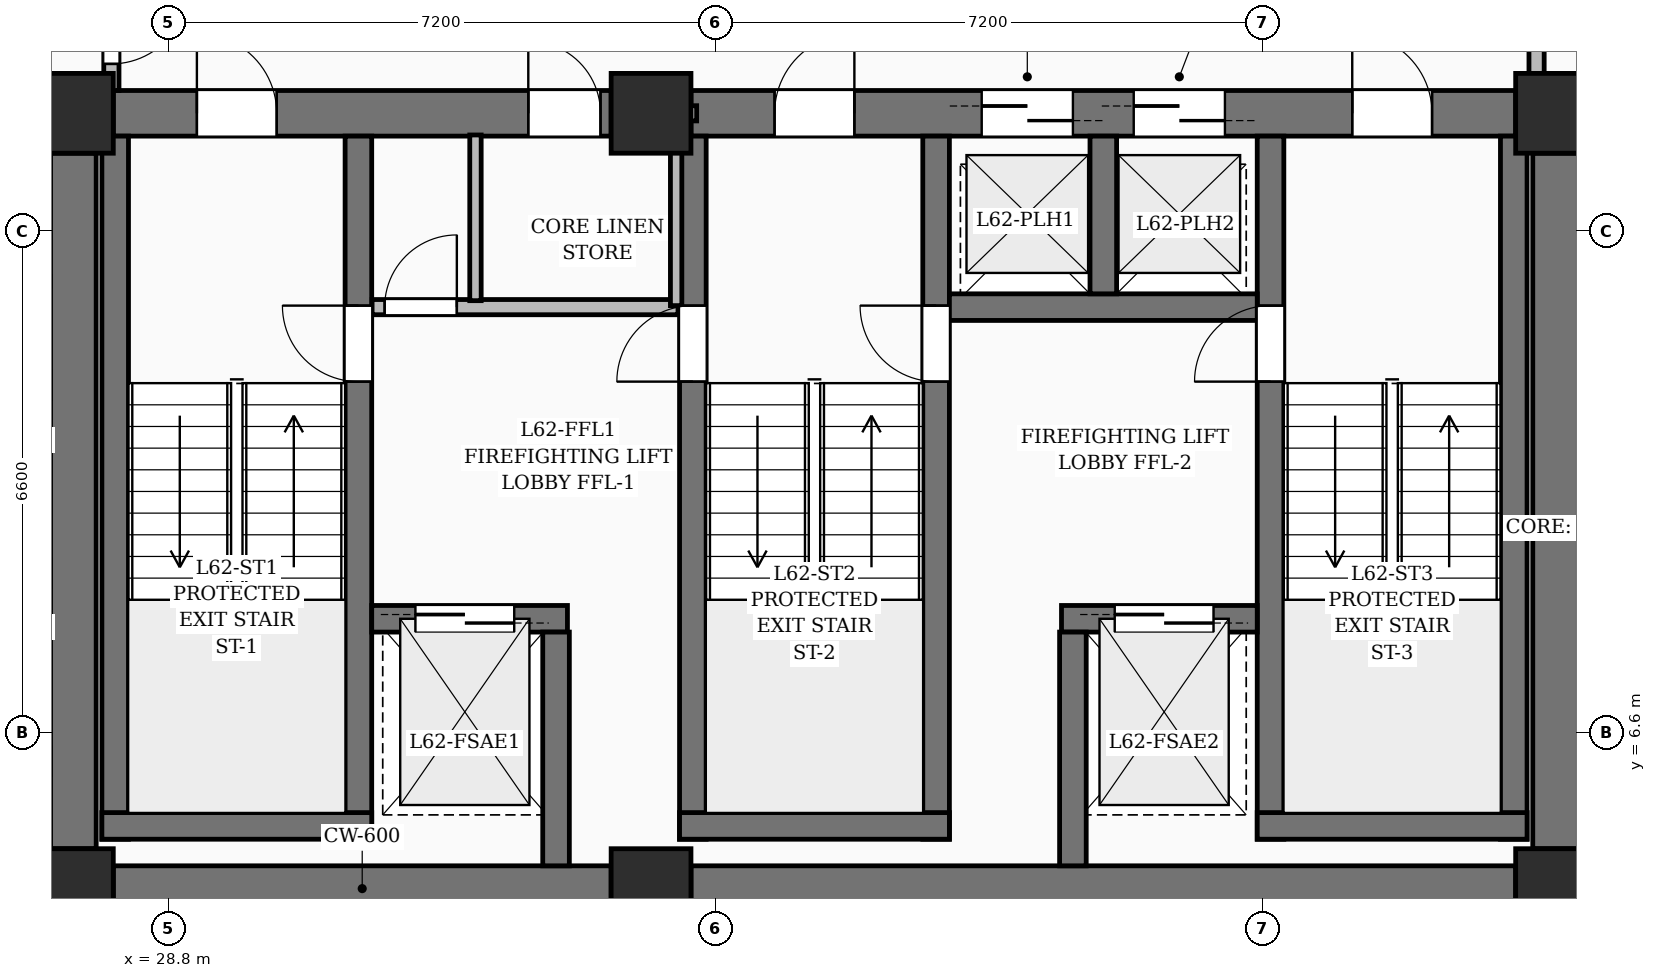
"""IFC4 building model, lengths in metres.
Left out: names, types, materials, properties, quantities, classifications, styles, units other than length and angle.
Written with IfcOpenShell. Run it as: python <this file> out.ifc"""

import sys

from ifc_helpers import new_model, si_unit, direction, frame, frame_2d, origin, origin_2d, place, context, subcontext, project, spatial, rectangle, extrude, element, fill, save


model = new_model("IFC4")
c1 = context("Model", 3, precision=1e-05, world=origin(), true_north=direction((0.0, 1.0)))
c2 = subcontext(c1, "Body", "Model", "MODEL_VIEW")
j1 = project(units=[si_unit("LENGTHUNIT", "METRE"), si_unit("PLANEANGLEUNIT", "RADIAN")], contexts=[c1])
p1 = place(None, origin())
s1 = spatial("IfcSite", under=j1, at=p1, CompositionType="ELEMENT")
p2 = place(p1, origin())
s2 = spatial("IfcBuilding", under=s1, at=p2, CompositionType="ELEMENT")
p3 = place(p2, frame((0.0, 0.0, 240.75)))
s3 = spatial("IfcBuildingStorey", under=s2, at=p3, CompositionType="ELEMENT", Elevation=240.75)
for number, where, z_axis, x_axis in (
    (1, (27.55, 4.55, 0.0), (0.0, 0.0, 1.0), (1.0, 0.0, 0.0)),
    (2, (35.15, 4.55, 0.0), (0.0, 0.0, 1.0), (1.0, 0.0, 0.0)),
    (3, (47.05, 4.55, 0.0), (0.0, 0.0, 1.0), (1.0, 0.0, 0.0)),
    (4, (27.55, 14.75, 0.0), (0.0, 0.0, 1.0), (1.0, 0.0, 0.0)),
    (5, (35.15, 14.75, 0.0), (0.0, 0.0, 1.0), (1.0, 0.0, 0.0)),
    (6, (47.05, 14.75, 0.0), (0.0, 0.0, 1.0), (1.0, 0.0, 0.0)),
):
    element("IfcColumn", number, at=place(p3, frame(where, z_axis=z_axis, x_axis=x_axis)), inside=s3, PredefinedType="COLUMN", context=c2, shape_type="SweptSolid", body=[
        extrude(rectangle(XDim=1.05, YDim=1.05, at=origin_2d()), origin(), (0.0, 0.0, 1.0), 3.75),
    ])
p4 = place(p3, frame((28.075, 4.55, 0.0), z_axis=(0.0, 0.0, 1.0), x_axis=(1.0, 0.0, 0.0)))
e7 = element("IfcWall", 7, at=p4, inside=s3, PredefinedType="SHEAR", context=c2, shape_type="SweptSolid", body=[
    extrude(rectangle(XDim=6.55, YDim=0.6, at=frame_2d((3.275, 0.0))), origin(), (0.0, 0.0, 1.0), 3.75),
])
p5 = place(p3, frame((35.675, 4.55, 0.0), z_axis=(0.0, 0.0, 1.0), x_axis=(1.0, 0.0, 0.0)))
e8 = element("IfcWall", 8, at=p5, inside=s3, PredefinedType="SHEAR", context=c2, shape_type="SweptSolid", body=[
    extrude(rectangle(XDim=10.85, YDim=0.6, at=frame_2d((5.425, 0.0))), origin(), (0.0, 0.0, 1.0), 3.75),
])
p6 = place(p3, frame((28.075, 14.75, 0.0), z_axis=(0.0, 0.0, 1.0), x_axis=(1.0, 0.0, 0.0)))
e9 = element("IfcWall", 9, at=p6, inside=s3, PredefinedType="SHEAR", context=c2, shape_type="SweptSolid", body=[
    extrude(rectangle(XDim=6.55, YDim=0.6, at=frame_2d((3.275, 0.0))), origin(), (0.0, 0.0, 1.0), 3.75),
])
p7 = place(p6, frame((1.1, 0.0, 0.0)))
e10 = element("IfcOpeningElement", 10, at=p7, cuts=e9, PredefinedType="OPENING", context=c2, shape_type="SweptSolid", body=[
    extrude(rectangle(XDim=1.05, YDim=2.15, at=frame_2d((0.525, 1.075))), frame((0.0, 0.31, 0.0), z_axis=(0.0, -1.0, 0.0), x_axis=(1.0, 0.0, 0.0)), (0.0, 0.0, 1.0), 0.62),
])
p8 = place(p6, frame((5.46, 0.0, 0.0)))
e11 = element("IfcOpeningElement", 11, at=p8, cuts=e9, PredefinedType="OPENING", context=c2, shape_type="SweptSolid", body=[
    extrude(rectangle(XDim=0.95, YDim=2.15, at=frame_2d((0.475, 1.075))), frame((0.0, 0.31, 0.0), z_axis=(0.0, -1.0, 0.0), x_axis=(1.0, 0.0, 0.0)), (0.0, 0.0, 1.0), 0.62),
])
p9 = place(p3, frame((35.675, 14.75, 0.0), z_axis=(0.0, 0.0, 1.0), x_axis=(1.0, 0.0, 0.0)))
e12 = element("IfcWall", 12, at=p9, inside=s3, PredefinedType="SHEAR", context=c2, shape_type="SweptSolid", body=[
    extrude(rectangle(XDim=10.85, YDim=0.6, at=frame_2d((5.425, 0.0))), origin(), (0.0, 0.0, 1.0), 3.75),
])
p10 = place(p9, frame((1.1, 0.0, 0.0)))
e13 = element("IfcOpeningElement", 13, at=p10, cuts=e12, PredefinedType="OPENING", context=c2, shape_type="SweptSolid", body=[
    extrude(rectangle(XDim=1.05, YDim=2.15, at=frame_2d((0.525, 1.075))), frame((0.0, 0.31, 0.0), z_axis=(0.0, -1.0, 0.0), x_axis=(1.0, 0.0, 0.0)), (0.0, 0.0, 1.0), 0.62),
])
p11 = place(p9, frame((8.7, 0.0, 0.0)))
e14 = element("IfcOpeningElement", 14, at=p11, cuts=e12, PredefinedType="OPENING", context=c2, shape_type="SweptSolid", body=[
    extrude(rectangle(XDim=1.05, YDim=2.15, at=frame_2d((0.525, 1.075))), frame((0.0, 0.31, 0.0), z_axis=(0.0, -1.0, 0.0), x_axis=(1.0, 0.0, 0.0)), (0.0, 0.0, 1.0), 0.62),
])
p12 = place(p9, frame((3.825, 0.0, 0.0)))
e15 = element("IfcOpeningElement", 15, at=p12, cuts=e12, PredefinedType="OPENING", context=c2, shape_type="SweptSolid", body=[
    extrude(rectangle(XDim=1.2, YDim=2.2, at=frame_2d((0.6, 1.1))), frame((0.0, 0.31, 0.0), z_axis=(0.0, -1.0, 0.0), x_axis=(1.0, 0.0, 0.0)), (0.0, 0.0, 1.0), 0.62),
])
p13 = place(p9, frame((5.825, 0.0, 0.0)))
e16 = element("IfcOpeningElement", 16, at=p13, cuts=e12, PredefinedType="OPENING", context=c2, shape_type="SweptSolid", body=[
    extrude(rectangle(XDim=1.2, YDim=2.2, at=frame_2d((0.6, 1.1))), frame((0.0, 0.31, 0.0), z_axis=(0.0, -1.0, 0.0), x_axis=(1.0, 0.0, 0.0)), (0.0, 0.0, 1.0), 0.62),
])
for number, where, z_axis, x_axis in (
    (17, (27.55, 5.075, 0.0), (0.0, 0.0, 1.0), (0.0, 1.0, 0.0)),
    (18, (47.05, 5.075, 0.0), (0.0, 0.0, 1.0), (0.0, 1.0, 0.0)),
):
    element("IfcWall", number, at=place(p3, frame(where, z_axis=z_axis, x_axis=x_axis)), inside=s3, PredefinedType="SHEAR", context=c2, shape_type="SweptSolid", body=[
        extrude(rectangle(XDim=9.15, YDim=0.6, at=frame_2d((4.575, 0.0))), origin(), (0.0, 0.0, 1.0), 3.75),
    ])
p14 = place(p3, frame((28.1, 5.2, 0.0), z_axis=(0.0, 0.0, 1.0), x_axis=(0.0, 1.0, 0.0)))
e19 = element("IfcWall", 19, at=p14, inside=s3, PredefinedType="SOLIDWALL", context=c2, shape_type="SweptSolid", body=[
    extrude(rectangle(XDim=9.25, YDim=0.35, at=frame_2d((4.625, 0.0))), origin(), (0.0, 0.0, 1.0), 3.75),
])
p15 = place(p3, frame((31.3, 5.2, 0.0), z_axis=(0.0, 0.0, 1.0), x_axis=(0.0, 1.0, 0.0)))
e20 = element("IfcWall", 20, at=p15, inside=s3, PredefinedType="SOLIDWALL", context=c2, shape_type="SweptSolid", body=[
    extrude(rectangle(XDim=9.25, YDim=0.35, at=frame_2d((4.625, 0.0))), origin(), (0.0, 0.0, 1.0), 3.75),
])
p16 = place(p15, frame((6.02, 0.0, 0.0)))
e21 = element("IfcOpeningElement", 21, at=p16, cuts=e20, PredefinedType="OPENING", context=c2, shape_type="SweptSolid", body=[
    extrude(rectangle(XDim=1.0, YDim=2.15, at=frame_2d((0.5, 1.075))), frame((0.0, 0.185, 0.0), z_axis=(0.0, -1.0, 0.0), x_axis=(1.0, 0.0, 0.0)), (0.0, 0.0, 1.0), 0.37),
])
p17 = place(p3, frame((27.925, 5.375, 0.0), z_axis=(0.0, 0.0, 1.0), x_axis=(1.0, 0.0, 0.0)))
e22 = element("IfcWall", 22, at=p17, inside=s3, PredefinedType="SOLIDWALL", context=c2, shape_type="SweptSolid", body=[
    extrude(rectangle(XDim=3.55, YDim=0.35, at=frame_2d((1.775, 0.0))), origin(), (0.0, 0.0, 1.0), 3.75),
])
p18 = place(p3, frame((35.7, 5.2, 0.0), z_axis=(0.0, 0.0, 1.0), x_axis=(0.0, 1.0, 0.0)))
e23 = element("IfcWall", 23, at=p18, inside=s3, PredefinedType="SOLIDWALL", context=c2, shape_type="SweptSolid", body=[
    extrude(rectangle(XDim=9.25, YDim=0.35, at=frame_2d((4.625, 0.0))), origin(), (0.0, 0.0, 1.0), 3.75),
])
p19 = place(p18, frame((6.02, 0.0, 0.0)))
e24 = element("IfcOpeningElement", 24, at=p19, cuts=e23, PredefinedType="OPENING", context=c2, shape_type="SweptSolid", body=[
    extrude(rectangle(XDim=1.0, YDim=2.15, at=frame_2d((0.5, 1.075))), frame((0.0, 0.185, 0.0), z_axis=(0.0, -1.0, 0.0), x_axis=(1.0, 0.0, 0.0)), (0.0, 0.0, 1.0), 0.37),
])
p20 = place(p3, frame((38.9, 5.2, 0.0), z_axis=(0.0, 0.0, 1.0), x_axis=(0.0, 1.0, 0.0)))
e25 = element("IfcWall", 25, at=p20, inside=s3, PredefinedType="SOLIDWALL", context=c2, shape_type="SweptSolid", body=[
    extrude(rectangle(XDim=9.25, YDim=0.35, at=frame_2d((4.625, 0.0))), origin(), (0.0, 0.0, 1.0), 3.75),
])
p21 = place(p20, frame((6.02, 0.0, 0.0)))
e26 = element("IfcOpeningElement", 26, at=p21, cuts=e25, PredefinedType="OPENING", context=c2, shape_type="SweptSolid", body=[
    extrude(rectangle(XDim=1.0, YDim=2.15, at=frame_2d((0.5, 1.075))), frame((0.0, 0.185, 0.0), z_axis=(0.0, -1.0, 0.0), x_axis=(1.0, 0.0, 0.0)), (0.0, 0.0, 1.0), 0.37),
])
p22 = place(p3, frame((35.525, 5.375, 0.0), z_axis=(0.0, 0.0, 1.0), x_axis=(1.0, 0.0, 0.0)))
e27 = element("IfcWall", 27, at=p22, inside=s3, PredefinedType="SOLIDWALL", context=c2, shape_type="SweptSolid", body=[
    extrude(rectangle(XDim=3.55, YDim=0.35, at=frame_2d((1.775, 0.0))), origin(), (0.0, 0.0, 1.0), 3.75),
])
p23 = place(p3, frame((43.3, 5.2, 0.0), z_axis=(0.0, 0.0, 1.0), x_axis=(0.0, 1.0, 0.0)))
e28 = element("IfcWall", 28, at=p23, inside=s3, PredefinedType="SOLIDWALL", context=c2, shape_type="SweptSolid", body=[
    extrude(rectangle(XDim=9.25, YDim=0.35, at=frame_2d((4.625, 0.0))), origin(), (0.0, 0.0, 1.0), 3.75),
])
p24 = place(p23, frame((6.02, 0.0, 0.0)))
e29 = element("IfcOpeningElement", 29, at=p24, cuts=e28, PredefinedType="OPENING", context=c2, shape_type="SweptSolid", body=[
    extrude(rectangle(XDim=1.0, YDim=2.15, at=frame_2d((0.5, 1.075))), frame((0.0, 0.185, 0.0), z_axis=(0.0, -1.0, 0.0), x_axis=(1.0, 0.0, 0.0)), (0.0, 0.0, 1.0), 0.37),
])
p25 = place(p3, frame((46.5, 5.2, 0.0), z_axis=(0.0, 0.0, 1.0), x_axis=(0.0, 1.0, 0.0)))
e30 = element("IfcWall", 30, at=p25, inside=s3, PredefinedType="SOLIDWALL", context=c2, shape_type="SweptSolid", body=[
    extrude(rectangle(XDim=9.25, YDim=0.35, at=frame_2d((4.625, 0.0))), origin(), (0.0, 0.0, 1.0), 3.75),
])
p26 = place(p3, frame((43.125, 5.375, 0.0), z_axis=(0.0, 0.0, 1.0), x_axis=(1.0, 0.0, 0.0)))
e31 = element("IfcWall", 31, at=p26, inside=s3, PredefinedType="SOLIDWALL", context=c2, shape_type="SweptSolid", body=[
    extrude(rectangle(XDim=3.55, YDim=0.35, at=frame_2d((1.775, 0.0))), origin(), (0.0, 0.0, 1.0), 3.75),
])
p27 = place(p3, frame((31.475, 8.1, 0.0), z_axis=(0.0, 0.0, 1.0), x_axis=(1.0, 0.0, 0.0)))
e32 = element("IfcWall", 32, at=p27, inside=s3, PredefinedType="SOLIDWALL", context=c2, shape_type="SweptSolid", body=[
    extrude(rectangle(XDim=2.575, YDim=0.35, at=frame_2d((1.288, 0.0))), origin(), (0.0, 0.0, 1.0), 3.75),
])
p28 = place(p27, frame((0.575, 0.0, 0.0)))
e33 = element("IfcOpeningElement", 33, at=p28, cuts=e32, PredefinedType="OPENING", context=c2, shape_type="SweptSolid", body=[
    extrude(rectangle(XDim=1.3, YDim=2.25, at=frame_2d((0.65, 1.125))), frame((0.0, 0.185, 0.0), z_axis=(0.0, -1.0, 0.0), x_axis=(1.0, 0.0, 0.0)), (0.0, 0.0, 1.0), 0.37),
])
p29 = place(p3, frame((40.55, 8.1, 0.0), z_axis=(0.0, 0.0, 1.0), x_axis=(1.0, 0.0, 0.0)))
e34 = element("IfcWall", 34, at=p29, inside=s3, PredefinedType="SOLIDWALL", context=c2, shape_type="SweptSolid", body=[
    extrude(rectangle(XDim=2.575, YDim=0.35, at=frame_2d((1.288, 0.0))), origin(), (0.0, 0.0, 1.0), 3.75),
])
p30 = place(p29, frame((0.7, 0.0, 0.0)))
e35 = element("IfcOpeningElement", 35, at=p30, cuts=e34, PredefinedType="OPENING", context=c2, shape_type="SweptSolid", body=[
    extrude(rectangle(XDim=1.3, YDim=2.25, at=frame_2d((0.65, 1.125))), frame((0.0, 0.185, 0.0), z_axis=(0.0, -1.0, 0.0), x_axis=(1.0, 0.0, 0.0)), (0.0, 0.0, 1.0), 0.37),
])
for number, where, z_axis, x_axis in (
    (36, (33.9, 4.85, 0.0), (0.0, 0.0, 1.0), (0.0, 1.0, 0.0)),
    (37, (40.7, 4.85, 0.0), (0.0, 0.0, 1.0), (0.0, 1.0, 0.0)),
):
    element("IfcWall", number, at=place(p3, frame(where, z_axis=z_axis, x_axis=x_axis)), inside=s3, PredefinedType="SOLIDWALL", context=c2, shape_type="SweptSolid", body=[
        extrude(rectangle(XDim=3.075, YDim=0.35, at=frame_2d((1.538, 0.0))), origin(), (0.0, 0.0, 1.0), 3.75),
    ])
p31 = place(p3, frame((39.075, 12.2, 0.0), z_axis=(0.0, 0.0, 1.0), x_axis=(1.0, 0.0, 0.0)))
e38 = element("IfcWall", 38, at=p31, inside=s3, PredefinedType="SOLIDWALL", context=c2, shape_type="SweptSolid", body=[
    extrude(rectangle(XDim=4.05, YDim=0.35, at=frame_2d((2.025, 0.0))), origin(), (0.0, 0.0, 1.0), 3.75),
])
p32 = place(p3, frame((41.1, 12.375, 0.0), z_axis=(0.0, 0.0, 1.0), x_axis=(0.0, 1.0, 0.0)))
e39 = element("IfcWall", 39, at=p32, inside=s3, PredefinedType="SOLIDWALL", context=c2, shape_type="SweptSolid", body=[
    extrude(rectangle(XDim=2.075, YDim=0.35, at=frame_2d((1.038, 0.0))), origin(), (0.0, 0.0, 1.0), 3.75),
])
p33 = place(p3, frame((34.72, 14.75, 0.0), z_axis=(0.0, 0.0, 1.0), x_axis=(1.0, 0.0, 0.0)))
e40 = element("IfcWall", 40, at=p33, inside=s3, PredefinedType="PARTITIONING", context=c2, shape_type="SweptSolid", body=[
    extrude(rectangle(XDim=1.03, YDim=0.2, at=frame_2d((0.515, 0.0))), origin(), (0.0, 0.0, 1.0), 2.685),
])
p34 = place(p3, frame((31.48, 12.2, 0.0), z_axis=(0.0, 0.0, 1.0), x_axis=(1.0, 0.0, 0.0)))
e41 = element("IfcWall", 41, at=p34, inside=s3, PredefinedType="PARTITIONING", context=c2, shape_type="SweptSolid", body=[
    extrude(rectangle(XDim=4.025, YDim=0.2, at=frame_2d((2.012, 0.0))), origin(), (0.0, 0.0, 1.0), 3.5),
])
p35 = place(p34, frame((0.165, 0.0, 0.0)))
e42 = element("IfcOpeningElement", 42, at=p35, cuts=e41, PredefinedType="OPENING", context=c2, shape_type="SweptSolid", body=[
    extrude(rectangle(XDim=0.95, YDim=2.15, at=frame_2d((0.475, 1.075))), frame((0.0, 0.11, 0.0), z_axis=(0.0, -1.0, 0.0), x_axis=(1.0, 0.0, 0.0)), (0.0, 0.0, 1.0), 0.22),
])
p36 = place(p3, frame((32.84, 12.285, 0.0), z_axis=(0.0, 0.0, 1.0), x_axis=(0.0, 1.0, 0.0)))
e43 = element("IfcWall", 43, at=p36, inside=s3, PredefinedType="PARTITIONING", context=c2, shape_type="SweptSolid", body=[
    extrude(rectangle(XDim=2.18, YDim=0.15, at=frame_2d((1.09, 0.0))), origin(), (0.0, 0.0, 1.0), 2.685),
])
p37 = place(p3, frame((35.48, 12.22, 0.0), z_axis=(0.0, 0.0, 1.0), x_axis=(0.0, 1.0, 0.0)))
e44 = element("IfcWall", 44, at=p37, inside=s3, PredefinedType="PARTITIONING", context=c2, shape_type="SweptSolid", body=[
    extrude(rectangle(XDim=2.396, YDim=0.15, at=frame_2d((1.198, 0.0))), origin(), (0.0, 0.0, 1.0), 3.5),
])
p38 = place(p3, frame((28.05, 16.75, 0.0), z_axis=(0.0, 0.0, 1.0), x_axis=(0.0, -1.0, 0.0)))
e45 = element("IfcWall", 45, at=p38, inside=s3, PredefinedType="PARTITIONING", context=c2, shape_type="SweptSolid", body=[
    extrude(rectangle(XDim=1.7, YDim=0.2, at=frame_2d((0.85, 0.0))), origin(), (0.0, 0.0, 1.0), 3.5),
])
p39 = place(p38, frame((0.35, 0.0, 0.0)))
e46 = element("IfcOpeningElement", 46, at=p39, cuts=e45, PredefinedType="OPENING", context=c2, shape_type="SweptSolid", body=[
    extrude(rectangle(XDim=1.0, YDim=2.2, at=frame_2d((0.5, 1.1))), frame((0.0, 0.11, 0.0), z_axis=(0.0, -1.0, 0.0), x_axis=(1.0, 0.0, 0.0)), (0.0, 0.0, 1.0), 0.22),
])
p40 = place(p3, frame((46.8, 15.05, 0.0), z_axis=(0.0, 0.0, 1.0), x_axis=(0.0, 1.0, 0.0)))
e47 = element("IfcWall", 47, at=p40, inside=s3, PredefinedType="PARTITIONING", context=c2, shape_type="SweptSolid", body=[
    extrude(rectangle(XDim=1.2, YDim=0.2, at=frame_2d((0.6, 0.0))), origin(), (0.0, 0.0, 1.0), 2.685),
])
p41 = place(p7, origin())
e48 = element("IfcDoor", 48, at=p41, inside=s3, OperationType="SINGLE_SWING_LEFT", PredefinedType="DOOR", context=c2, shape_type="SweptSolid", body=[
    extrude(rectangle(XDim=1.05, YDim=2.15, at=frame_2d((0.525, 1.075))), frame((0.0, 0.025, 0.0), z_axis=(0.0, -1.0, 0.0), x_axis=(1.0, 0.0, 0.0)), (0.0, 0.0, 1.0), 0.05),
])
fill(e10, e48)
p42 = place(p10, origin())
e49 = element("IfcDoor", 49, at=p42, inside=s3, OperationType="SINGLE_SWING_RIGHT", PredefinedType="DOOR", context=c2, shape_type="SweptSolid", body=[
    extrude(rectangle(XDim=1.05, YDim=2.15, at=frame_2d((0.525, 1.075))), frame((0.0, 0.025, 0.0), z_axis=(0.0, -1.0, 0.0), x_axis=(1.0, 0.0, 0.0)), (0.0, 0.0, 1.0), 0.05),
])
fill(e13, e49)
p43 = place(p11, origin())
e50 = element("IfcDoor", 50, at=p43, inside=s3, OperationType="SINGLE_SWING_LEFT", PredefinedType="DOOR", context=c2, shape_type="SweptSolid", body=[
    extrude(rectangle(XDim=1.05, YDim=2.15, at=frame_2d((0.525, 1.075))), frame((0.0, 0.025, 0.0), z_axis=(0.0, -1.0, 0.0), x_axis=(1.0, 0.0, 0.0)), (0.0, 0.0, 1.0), 0.05),
])
fill(e14, e50)
p44 = place(p16, origin())
e51 = element("IfcDoor", 51, at=p44, inside=s3, OperationType="SINGLE_SWING_RIGHT", PredefinedType="DOOR", context=c2, shape_type="SweptSolid", body=[
    extrude(rectangle(XDim=1.0, YDim=2.15, at=frame_2d((0.5, 1.075))), frame((0.0, 0.025, 0.0), z_axis=(0.0, -1.0, 0.0), x_axis=(1.0, 0.0, 0.0)), (0.0, 0.0, 1.0), 0.05),
])
fill(e21, e51)
p45 = place(p19, origin())
e52 = element("IfcDoor", 52, at=p45, inside=s3, OperationType="SINGLE_SWING_LEFT", PredefinedType="DOOR", context=c2, shape_type="SweptSolid", body=[
    extrude(rectangle(XDim=1.0, YDim=2.15, at=frame_2d((0.5, 1.075))), frame((0.0, 0.025, 0.0), z_axis=(0.0, -1.0, 0.0), x_axis=(1.0, 0.0, 0.0)), (0.0, 0.0, 1.0), 0.05),
])
fill(e24, e52)
p46 = place(p21, origin())
e53 = element("IfcDoor", 53, at=p46, inside=s3, OperationType="SINGLE_SWING_RIGHT", PredefinedType="DOOR", context=c2, shape_type="SweptSolid", body=[
    extrude(rectangle(XDim=1.0, YDim=2.15, at=frame_2d((0.5, 1.075))), frame((0.0, 0.025, 0.0), z_axis=(0.0, -1.0, 0.0), x_axis=(1.0, 0.0, 0.0)), (0.0, 0.0, 1.0), 0.05),
])
fill(e26, e53)
p47 = place(p24, origin())
e54 = element("IfcDoor", 54, at=p47, inside=s3, OperationType="SINGLE_SWING_LEFT", PredefinedType="DOOR", context=c2, shape_type="SweptSolid", body=[
    extrude(rectangle(XDim=1.0, YDim=2.15, at=frame_2d((0.5, 1.075))), frame((0.0, 0.025, 0.0), z_axis=(0.0, -1.0, 0.0), x_axis=(1.0, 0.0, 0.0)), (0.0, 0.0, 1.0), 0.05),
])
fill(e29, e54)
p48 = place(p28, origin())
e55 = element("IfcDoor", 55, at=p48, inside=s3, OperationType="DOUBLE_DOOR_SLIDING", PredefinedType="DOOR", context=c2, shape_type="SweptSolid", body=[
    extrude(rectangle(XDim=1.3, YDim=2.25, at=frame_2d((0.65, 1.125))), frame((0.0, 0.025, 0.0), z_axis=(0.0, -1.0, 0.0), x_axis=(1.0, 0.0, 0.0)), (0.0, 0.0, 1.0), 0.05),
])
fill(e33, e55)
p49 = place(p30, origin())
e56 = element("IfcDoor", 56, at=p49, inside=s3, OperationType="DOUBLE_DOOR_SLIDING", PredefinedType="DOOR", context=c2, shape_type="SweptSolid", body=[
    extrude(rectangle(XDim=1.3, YDim=2.25, at=frame_2d((0.65, 1.125))), frame((0.0, 0.025, 0.0), z_axis=(0.0, -1.0, 0.0), x_axis=(1.0, 0.0, 0.0)), (0.0, 0.0, 1.0), 0.05),
])
fill(e35, e56)
p50 = place(p12, origin())
e57 = element("IfcDoor", 57, at=p50, inside=s3, OperationType="DOUBLE_DOOR_SLIDING", PredefinedType="DOOR", context=c2, shape_type="SweptSolid", body=[
    extrude(rectangle(XDim=1.2, YDim=2.2, at=frame_2d((0.6, 1.1))), frame((0.0, 0.025, 0.0), z_axis=(0.0, -1.0, 0.0), x_axis=(1.0, 0.0, 0.0)), (0.0, 0.0, 1.0), 0.05),
])
fill(e15, e57)
p51 = place(p13, origin())
e58 = element("IfcDoor", 58, at=p51, inside=s3, OperationType="DOUBLE_DOOR_SLIDING", PredefinedType="DOOR", context=c2, shape_type="SweptSolid", body=[
    extrude(rectangle(XDim=1.2, YDim=2.2, at=frame_2d((0.6, 1.1))), frame((0.0, 0.025, 0.0), z_axis=(0.0, -1.0, 0.0), x_axis=(1.0, 0.0, 0.0)), (0.0, 0.0, 1.0), 0.05),
])
fill(e16, e58)
p52 = place(p35, origin())
e59 = element("IfcDoor", 59, at=p52, inside=s3, OperationType="SINGLE_SWING_RIGHT", PredefinedType="DOOR", context=c2, shape_type="SweptSolid", body=[
    extrude(rectangle(XDim=0.95, YDim=2.15, at=frame_2d((0.475, 1.075))), frame((0.0, 0.025, 0.0), z_axis=(0.0, -1.0, 0.0), x_axis=(1.0, 0.0, 0.0)), (0.0, 0.0, 1.0), 0.05),
])
fill(e42, e59)
p53 = place(p8, origin())
e60 = element("IfcDoor", 60, at=p53, inside=s3, OperationType="SINGLE_SWING_LEFT", PredefinedType="DOOR", context=c2, shape_type="SweptSolid", body=[
    extrude(rectangle(XDim=0.95, YDim=2.15, at=frame_2d((0.475, 1.075))), frame((0.0, 0.025, 0.0), z_axis=(0.0, -1.0, 0.0), x_axis=(1.0, 0.0, 0.0)), (0.0, 0.0, 1.0), 0.05),
])
fill(e11, e60)
p54 = place(p39, origin())
e61 = element("IfcDoor", 61, at=p54, inside=s3, OperationType="SINGLE_SWING_LEFT", PredefinedType="DOOR", context=c2, shape_type="SweptSolid", body=[
    extrude(rectangle(XDim=1.0, YDim=2.2, at=frame_2d((0.5, 1.1))), frame((0.0, 0.025, 0.0), z_axis=(0.0, -1.0, 0.0), x_axis=(1.0, 0.0, 0.0)), (0.0, 0.0, 1.0), 0.05),
])
fill(e46, e61)
save(model, sys.argv[1])
